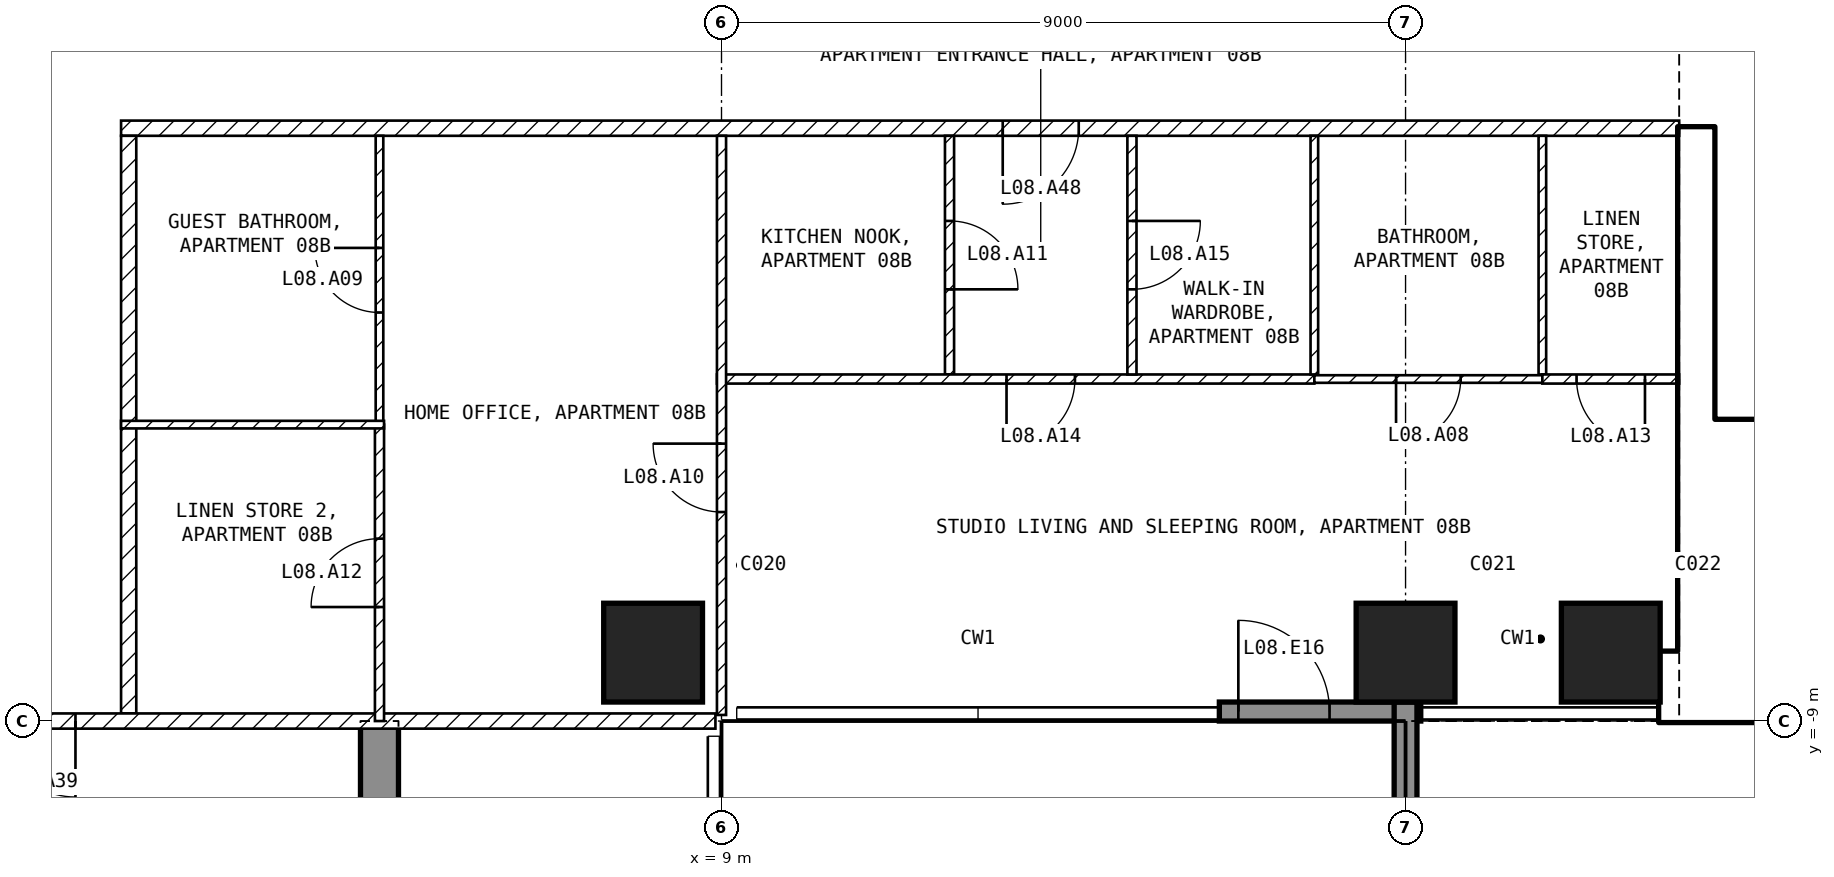
"""IFC4 building model, lengths in metres.
Left out: names, types, materials, properties, quantities, classifications, styles, units other than length and angle.
Written with IfcOpenShell. Run it as: python <this file> out.ifc"""

import sys

from ifc_helpers import new_model, si_unit, direction, frame, frame_2d, origin, origin_2d, place, context, subcontext, project, spatial, polyline, rectangle, outline, extrude, element, fill, save


model = new_model("IFC4")
c1 = context("Model", 3, precision=1e-05, world=origin(), true_north=direction((0.0, 1.0)))
c2 = subcontext(c1, "Body", "Model", "MODEL_VIEW")
j1 = project(units=[si_unit("LENGTHUNIT", "METRE"), si_unit("PLANEANGLEUNIT", "RADIAN")], contexts=[c1])
p1 = place(None, origin())
s1 = spatial("IfcSite", under=j1, at=p1, CompositionType="ELEMENT")
p2 = place(p1, origin())
s2 = spatial("IfcBuilding", under=s1, at=p2, CompositionType="ELEMENT")
p3 = place(p2, frame((0.0, 0.0, 47.0)))
s3 = spatial("IfcBuildingStorey", under=s2, at=p3, CompositionType="ELEMENT", Elevation=47.0)
for number, where, z_axis, x_axis in (
    (1, (8.1, -8.1, -0.25), (0.0, 0.0, 1.0), (1.0, 0.0, 0.0)),
    (2, (18.0, -8.1, -0.25), (0.0, 0.0, 1.0), (1.0, 0.0, 0.0)),
    (3, (20.7, -8.1, -0.25), (0.0, 0.0, 1.0), (1.0, 0.0, 0.0)),
):
    element("IfcColumn", number, at=place(p3, frame(where, z_axis=z_axis, x_axis=x_axis)), inside=s3, PredefinedType="COLUMN", context=c2, shape_type="SweptSolid", body=[
        extrude(rectangle(XDim=1.3, YDim=1.3, at=origin_2d()), origin(), (0.0, 0.0, 1.0), 3.5),
    ])
p4 = place(p3, frame((4.25, -25.45, -0.25), z_axis=(1.0, 0.0, 0.0), x_axis=(0.0, 1.0, 0.0)))
e4 = element("IfcWall", 4, at=p4, inside=s3, PredefinedType="SHEAR", context=c2, shape_type="SweptSolid", body=[
    extrude(outline(polyline([(0.0, 0.0), (4.15, 0.0), (4.15, 2.65), (6.55, 2.65), (6.55, 0.0), (11.95, 0.0), (11.95, 2.65), (14.35, 2.65), (14.35, 0.0), (16.45, 0.0), (16.45, 3.5), (0.0, 3.5), (0.0, 0.0)])), origin(), (0.0, 0.0, 1.0), 0.5),
])
p5 = place(p3, frame((15.55, -8.875, 0.0), z_axis=(0.0, 0.0, 1.0), x_axis=(1.0, 0.0, 0.0)))
e5 = element("IfcWall", 5, at=p5, inside=s3, PredefinedType="SOLIDWALL", context=c2, shape_type="SweptSolid", body=[
    extrude(rectangle(XDim=2.65, YDim=0.25, at=frame_2d((1.325, 0.0))), origin(), (0.0, 0.0, 1.0), 3.25),
])
p6 = place(p5, frame((0.25, 0.0, 0.0)))
e6 = element("IfcOpeningElement", 6, at=p6, cuts=e5, PredefinedType="OPENING", context=c2, shape_type="SweptSolid", body=[
    extrude(rectangle(XDim=1.2, YDim=2.4, at=frame_2d((0.6, 1.2))), frame((0.0, 0.135, 0.0), z_axis=(0.0, -1.0, 0.0), x_axis=(1.0, 0.0, 0.0)), (0.0, 0.0, 1.0), 0.27),
])
p7 = place(p3, frame((18.0, -8.75, 0.0), z_axis=(0.0, 0.0, 1.0), x_axis=(0.0, -1.0, 0.0)))
e7 = element("IfcWall", 7, at=p7, inside=s3, PredefinedType="SOLIDWALL", context=c2, shape_type="SweptSolid", body=[
    extrude(rectangle(XDim=2.95, YDim=0.3, at=frame_2d((1.475, 0.0))), origin(), (0.0, 0.0, 1.0), 3.25),
])
p8 = place(p3, frame((21.35, -8.55, 0.0), z_axis=(0.0, 0.0, 1.0), x_axis=(1.0, 0.0, 0.0)))
e8 = element("IfcWall", 8, at=p8, inside=s3, PredefinedType="SHEAR", context=c2, shape_type="SweptSolid", body=[
    extrude(rectangle(XDim=11.05, YDim=0.9, at=frame_2d((5.525, 0.0))), origin(), (0.0, 0.0, 1.0), 3.25),
])
p9 = place(p3, frame((21.825, -8.1, 0.0), z_axis=(0.0, 0.0, 1.0), x_axis=(0.0, 1.0, 0.0)))
e9 = element("IfcWall", 9, at=p9, inside=s3, PredefinedType="SHEAR", context=c2, shape_type="SweptSolid", body=[
    extrude(rectangle(XDim=6.9, YDim=0.45, at=frame_2d((3.45, 0.0))), origin(), (0.0, 0.0, 1.0), 3.25),
])
p10 = place(p3, frame((22.05, -5.15, 0.0), z_axis=(0.0, 0.0, 1.0), x_axis=(1.0, 0.0, 0.0)))
e10 = element("IfcWall", 10, at=p10, inside=s3, PredefinedType="SOLIDWALL", context=c2, shape_type="SweptSolid", body=[
    extrude(rectangle(XDim=6.3, YDim=0.2, at=frame_2d((3.15, 0.0))), origin(), (0.0, 0.0, 1.0), 3.25),
])
p11 = place(p10, frame((0.2, 0.0, 0.0)))
e11 = element("IfcOpeningElement", 11, at=p11, cuts=e10, PredefinedType="OPENING", context=c2, shape_type="SweptSolid", body=[
    extrude(rectangle(XDim=1.0, YDim=2.1, at=frame_2d((0.5, 1.05))), frame((0.0, 0.11, 0.0), z_axis=(0.0, -1.0, 0.0), x_axis=(1.0, 0.0, 0.0)), (0.0, 0.0, 1.0), 0.22),
])
p12 = place(p3, frame((21.6, -1.2, 0.0), z_axis=(0.0, 0.0, 1.0), x_axis=(-1.0, 0.0, 0.0)))
e12 = element("IfcWall", 12, at=p12, inside=s3, PredefinedType="PARTITIONING", context=c2, shape_type="SweptSolid", body=[
    extrude(rectangle(XDim=20.5, YDim=0.2, at=frame_2d((10.25, 0.0))), origin(), (0.0, 0.0, 1.0), 3.25),
])
p13 = place(p12, frame((7.9, 0.0, 0.0)))
e13 = element("IfcOpeningElement", 13, at=p13, cuts=e12, PredefinedType="OPENING", context=c2, shape_type="SweptSolid", body=[
    extrude(rectangle(XDim=1.0, YDim=2.1, at=frame_2d((0.5, 1.05))), frame((0.0, 0.11, 0.0), z_axis=(0.0, -1.0, 0.0), x_axis=(1.0, 0.0, 0.0)), (0.0, 0.0, 1.0), 0.22),
])
p14 = place(p3, frame((1.2, -1.3, 0.0), z_axis=(0.0, 0.0, 1.0), x_axis=(0.0, -1.0, 0.0)))
e14 = element("IfcWall", 14, at=p14, inside=s3, PredefinedType="PARTITIONING", context=c2, shape_type="SweptSolid", body=[
    extrude(rectangle(XDim=7.6, YDim=0.2, at=frame_2d((3.8, 0.0))), origin(), (0.0, 0.0, 1.0), 3.25),
])
p15 = place(p3, frame((8.92, -9.0, 0.0), z_axis=(0.0, 0.0, 1.0), x_axis=(-1.0, 0.0, 0.0)))
e15 = element("IfcWall", 15, at=p15, inside=s3, PredefinedType="PARTITIONING", context=c2, shape_type="SweptSolid", body=[
    extrude(rectangle(XDim=17.84, YDim=0.2, at=frame_2d((8.92, 0.0))), origin(), (0.0, 0.0, 1.0), 3.25),
])
p16 = place(p15, frame((8.42, 0.0, 0.0)))
e16 = element("IfcOpeningElement", 16, at=p16, cuts=e15, PredefinedType="OPENING", context=c2, shape_type="SweptSolid", body=[
    extrude(rectangle(XDim=1.0, YDim=2.1, at=frame_2d((0.5, 1.05))), frame((0.0, 0.11, 0.0), z_axis=(0.0, -1.0, 0.0), x_axis=(1.0, 0.0, 0.0)), (0.0, 0.0, 1.0), 0.22),
])
p17 = place(p3, frame((12.0, -1.3, 0.0), z_axis=(0.0, 0.0, 1.0), x_axis=(0.0, -1.0, 0.0)))
e17 = element("IfcWall", 17, at=p17, inside=s3, PredefinedType="PARTITIONING", context=c2, shape_type="SweptSolid", body=[
    extrude(rectangle(XDim=3.14, YDim=0.12, at=frame_2d((1.57, 0.0))), origin(), (0.0, 0.0, 1.0), 3.25),
])
p18 = place(p17, frame((1.12, 0.0, 0.0)))
e18 = element("IfcOpeningElement", 18, at=p18, cuts=e17, PredefinedType="OPENING", context=c2, shape_type="SweptSolid", body=[
    extrude(rectangle(XDim=0.9, YDim=2.1, at=frame_2d((0.45, 1.05))), frame((0.0, 0.07, 0.0), z_axis=(0.0, -1.0, 0.0), x_axis=(1.0, 0.0, 0.0)), (0.0, 0.0, 1.0), 0.14),
])
p19 = place(p3, frame((16.8, -4.5, 0.0), z_axis=(0.0, 0.0, 1.0), x_axis=(-1.0, 0.0, 0.0)))
e19 = element("IfcWall", 19, at=p19, inside=s3, PredefinedType="PARTITIONING", context=c2, shape_type="SweptSolid", body=[
    extrude(rectangle(XDim=7.86, YDim=0.12, at=frame_2d((3.93, 0.0))), origin(), (0.0, 0.0, 1.0), 3.25),
])
p20 = place(p19, frame((3.15, 0.0, 0.0)))
e20 = element("IfcOpeningElement", 20, at=p20, cuts=e19, PredefinedType="OPENING", context=c2, shape_type="SweptSolid", body=[
    extrude(rectangle(XDim=0.9, YDim=2.1, at=frame_2d((0.45, 1.05))), frame((0.0, 0.07, 0.0), z_axis=(0.0, -1.0, 0.0), x_axis=(1.0, 0.0, 0.0)), (0.0, 0.0, 1.0), 0.14),
])
p21 = place(p3, frame((9.0, -8.92, 0.0), z_axis=(0.0, 0.0, 1.0), x_axis=(0.0, 1.0, 0.0)))
e21 = element("IfcWall", 21, at=p21, inside=s3, PredefinedType="PARTITIONING", context=c2, shape_type="SweptSolid", body=[
    extrude(rectangle(XDim=7.62, YDim=0.12, at=frame_2d((3.81, 0.0))), origin(), (0.0, 0.0, 1.0), 3.25),
])
p22 = place(p21, frame((2.67, 0.0, 0.0)))
e22 = element("IfcOpeningElement", 22, at=p22, cuts=e21, PredefinedType="OPENING", context=c2, shape_type="SweptSolid", body=[
    extrude(rectangle(XDim=0.9, YDim=2.1, at=frame_2d((0.45, 1.05))), frame((0.0, 0.07, 0.0), z_axis=(0.0, -1.0, 0.0), x_axis=(1.0, 0.0, 0.0)), (0.0, 0.0, 1.0), 0.14),
])
p23 = place(p3, frame((14.4, -1.3, 0.0), z_axis=(0.0, 0.0, 1.0), x_axis=(0.0, -1.0, 0.0)))
e23 = element("IfcWall", 23, at=p23, inside=s3, PredefinedType="PARTITIONING", context=c2, shape_type="SweptSolid", body=[
    extrude(rectangle(XDim=3.14, YDim=0.12, at=frame_2d((1.57, 0.0))), origin(), (0.0, 0.0, 1.0), 3.25),
])
p24 = place(p23, frame((1.12, 0.0, 0.0)))
e24 = element("IfcOpeningElement", 24, at=p24, cuts=e23, PredefinedType="OPENING", context=c2, shape_type="SweptSolid", body=[
    extrude(rectangle(XDim=0.9, YDim=2.1, at=frame_2d((0.45, 1.05))), frame((0.0, 0.07, 0.0), z_axis=(0.0, -1.0, 0.0), x_axis=(1.0, 0.0, 0.0)), (0.0, 0.0, 1.0), 0.14),
])
for number, where, z_axis, x_axis in (
    (25, (16.8, -1.3, 0.0), (0.0, 0.0, 1.0), (0.0, -1.0, 0.0)),
    (26, (19.8, -1.3, 0.0), (0.0, 0.0, 1.0), (0.0, -1.0, 0.0)),
):
    element("IfcWall", number, at=place(p3, frame(where, z_axis=z_axis, x_axis=x_axis)), inside=s3, PredefinedType="PARTITIONING", context=c2, shape_type="SweptSolid", body=[
        extrude(rectangle(XDim=3.14, YDim=0.1, at=frame_2d((1.57, 0.0))), origin(), (0.0, 0.0, 1.0), 3.25),
    ])
p25 = place(p3, frame((19.8, -4.5, 0.0), z_axis=(0.0, 0.0, 1.0), x_axis=(-1.0, 0.0, 0.0)))
e27 = element("IfcWall", 27, at=p25, inside=s3, PredefinedType="PARTITIONING", context=c2, shape_type="SweptSolid", body=[
    extrude(rectangle(XDim=3.0, YDim=0.1, at=frame_2d((1.5, 0.0))), origin(), (0.0, 0.0, 1.0), 3.25),
])
p26 = place(p25, frame((1.075, 0.0, 0.0)))
e28 = element("IfcOpeningElement", 28, at=p26, cuts=e27, PredefinedType="OPENING", context=c2, shape_type="SweptSolid", body=[
    extrude(rectangle(XDim=0.85, YDim=2.1, at=frame_2d((0.425, 1.05))), frame((0.0, 0.06, 0.0), z_axis=(0.0, -1.0, 0.0), x_axis=(1.0, 0.0, 0.0)), (0.0, 0.0, 1.0), 0.12),
])
p27 = place(p3, frame((21.6, -4.5, 0.0), z_axis=(0.0, 0.0, 1.0), x_axis=(-1.0, 0.0, 0.0)))
e29 = element("IfcWall", 29, at=p27, inside=s3, PredefinedType="PARTITIONING", context=c2, shape_type="SweptSolid", body=[
    extrude(rectangle(XDim=1.8, YDim=0.12, at=frame_2d((0.9, 0.0))), origin(), (0.0, 0.0, 1.0), 3.25),
])
p28 = place(p27, frame((0.45, 0.0, 0.0)))
e30 = element("IfcOpeningElement", 30, at=p28, cuts=e29, PredefinedType="OPENING", context=c2, shape_type="SweptSolid", body=[
    extrude(rectangle(XDim=0.9, YDim=2.1, at=frame_2d((0.45, 1.05))), frame((0.0, 0.07, 0.0), z_axis=(0.0, -1.0, 0.0), x_axis=(1.0, 0.0, 0.0)), (0.0, 0.0, 1.0), 0.14),
])
p29 = place(p3, frame((4.5, -5.1, 0.0), z_axis=(0.0, 0.0, 1.0), x_axis=(0.0, 1.0, 0.0)))
e31 = element("IfcWall", 31, at=p29, inside=s3, PredefinedType="PARTITIONING", context=c2, shape_type="SweptSolid", body=[
    extrude(rectangle(XDim=3.8, YDim=0.1, at=frame_2d((1.9, 0.0))), origin(), (0.0, 0.0, 1.0), 3.25),
])
p30 = place(p29, frame((1.475, 0.0, 0.0)))
e32 = element("IfcOpeningElement", 32, at=p30, cuts=e31, PredefinedType="OPENING", context=c2, shape_type="SweptSolid", body=[
    extrude(rectangle(XDim=0.85, YDim=2.1, at=frame_2d((0.425, 1.05))), frame((0.0, 0.06, 0.0), z_axis=(0.0, -1.0, 0.0), x_axis=(1.0, 0.0, 0.0)), (0.0, 0.0, 1.0), 0.12),
])
p31 = place(p3, frame((4.5, -9.0, 0.0), z_axis=(0.0, 0.0, 1.0), x_axis=(0.0, 1.0, 0.0)))
e33 = element("IfcWall", 33, at=p31, inside=s3, PredefinedType="PARTITIONING", context=c2, shape_type="SweptSolid", body=[
    extrude(rectangle(XDim=3.9, YDim=0.12, at=frame_2d((1.95, 0.0))), origin(), (0.0, 0.0, 1.0), 3.25),
])
p32 = place(p31, frame((1.5, 0.0, 0.0)))
e34 = element("IfcOpeningElement", 34, at=p32, cuts=e33, PredefinedType="OPENING", context=c2, shape_type="SweptSolid", body=[
    extrude(rectangle(XDim=0.9, YDim=2.1, at=frame_2d((0.45, 1.05))), frame((0.0, 0.07, 0.0), z_axis=(0.0, -1.0, 0.0), x_axis=(1.0, 0.0, 0.0)), (0.0, 0.0, 1.0), 0.14),
])
p33 = place(p3, frame((4.56, -5.1, 0.0), z_axis=(0.0, 0.0, 1.0), x_axis=(-1.0, 0.0, 0.0)))
e35 = element("IfcWall", 35, at=p33, inside=s3, PredefinedType="PARTITIONING", context=c2, shape_type="SweptSolid", body=[
    extrude(rectangle(XDim=3.46, YDim=0.1, at=frame_2d((1.73, 0.0))), origin(), (0.0, 0.0, 1.0), 3.25),
])
p34 = place(p6, origin())
e36 = element("IfcDoor", 36, at=p34, inside=s3, OperationType="SINGLE_SWING_LEFT", PredefinedType="DOOR", context=c2, shape_type="SweptSolid", body=[
    extrude(rectangle(XDim=1.2, YDim=2.4, at=frame_2d((0.6, 1.2))), frame((0.0, 0.025, 0.0), z_axis=(0.0, -1.0, 0.0), x_axis=(1.0, 0.0, 0.0)), (0.0, 0.0, 1.0), 0.05),
])
fill(e6, e36)
p35 = place(p11, origin())
e37 = element("IfcDoor", 37, at=p35, inside=s3, OperationType="SINGLE_SWING_LEFT", PredefinedType="DOOR", context=c2, shape_type="SweptSolid", body=[
    extrude(rectangle(XDim=1.0, YDim=2.1, at=frame_2d((0.5, 1.05))), frame((0.0, 0.025, 0.0), z_axis=(0.0, -1.0, 0.0), x_axis=(1.0, 0.0, 0.0)), (0.0, 0.0, 1.0), 0.05),
])
fill(e11, e37)
p36 = place(p26, origin())
e38 = element("IfcDoor", 38, at=p36, inside=s3, OperationType="SINGLE_SWING_RIGHT", PredefinedType="DOOR", context=c2, shape_type="SweptSolid", body=[
    extrude(rectangle(XDim=0.85, YDim=2.1, at=frame_2d((0.425, 1.05))), frame((0.0, 0.025, 0.0), z_axis=(0.0, -1.0, 0.0), x_axis=(1.0, 0.0, 0.0)), (0.0, 0.0, 1.0), 0.05),
])
fill(e28, e38)
p37 = place(p30, origin())
e39 = element("IfcDoor", 39, at=p37, inside=s3, OperationType="SINGLE_SWING_RIGHT", PredefinedType="DOOR", context=c2, shape_type="SweptSolid", body=[
    extrude(rectangle(XDim=0.85, YDim=2.1, at=frame_2d((0.425, 1.05))), frame((0.0, 0.025, 0.0), z_axis=(0.0, -1.0, 0.0), x_axis=(1.0, 0.0, 0.0)), (0.0, 0.0, 1.0), 0.05),
])
fill(e32, e39)
p38 = place(p22, origin())
e40 = element("IfcDoor", 40, at=p38, inside=s3, OperationType="SINGLE_SWING_RIGHT", PredefinedType="DOOR", context=c2, shape_type="SweptSolid", body=[
    extrude(rectangle(XDim=0.9, YDim=2.1, at=frame_2d((0.45, 1.05))), frame((0.0, 0.025, 0.0), z_axis=(0.0, -1.0, 0.0), x_axis=(1.0, 0.0, 0.0)), (0.0, 0.0, 1.0), 0.05),
])
fill(e22, e40)
p39 = place(p18, origin())
e41 = element("IfcDoor", 41, at=p39, inside=s3, OperationType="SINGLE_SWING_RIGHT", PredefinedType="DOOR", context=c2, shape_type="SweptSolid", body=[
    extrude(rectangle(XDim=0.9, YDim=2.1, at=frame_2d((0.45, 1.05))), frame((0.0, 0.025, 0.0), z_axis=(0.0, -1.0, 0.0), x_axis=(1.0, 0.0, 0.0)), (0.0, 0.0, 1.0), 0.05),
])
fill(e18, e41)
p40 = place(p32, origin())
e42 = element("IfcDoor", 42, at=p40, inside=s3, OperationType="SINGLE_SWING_LEFT", PredefinedType="DOOR", context=c2, shape_type="SweptSolid", body=[
    extrude(rectangle(XDim=0.9, YDim=2.1, at=frame_2d((0.45, 1.05))), frame((0.0, 0.025, 0.0), z_axis=(0.0, -1.0, 0.0), x_axis=(1.0, 0.0, 0.0)), (0.0, 0.0, 1.0), 0.05),
])
fill(e34, e42)
p41 = place(p28, origin())
e43 = element("IfcDoor", 43, at=p41, inside=s3, OperationType="SINGLE_SWING_LEFT", PredefinedType="DOOR", context=c2, shape_type="SweptSolid", body=[
    extrude(rectangle(XDim=0.9, YDim=2.1, at=frame_2d((0.45, 1.05))), frame((0.0, 0.025, 0.0), z_axis=(0.0, -1.0, 0.0), x_axis=(1.0, 0.0, 0.0)), (0.0, 0.0, 1.0), 0.05),
])
fill(e30, e43)
p42 = place(p20, origin())
e44 = element("IfcDoor", 44, at=p42, inside=s3, OperationType="SINGLE_SWING_RIGHT", PredefinedType="DOOR", context=c2, shape_type="SweptSolid", body=[
    extrude(rectangle(XDim=0.9, YDim=2.1, at=frame_2d((0.45, 1.05))), frame((0.0, 0.025, 0.0), z_axis=(0.0, -1.0, 0.0), x_axis=(1.0, 0.0, 0.0)), (0.0, 0.0, 1.0), 0.05),
])
fill(e20, e44)
p43 = place(p24, origin())
e45 = element("IfcDoor", 45, at=p43, inside=s3, OperationType="SINGLE_SWING_LEFT", PredefinedType="DOOR", context=c2, shape_type="SweptSolid", body=[
    extrude(rectangle(XDim=0.9, YDim=2.1, at=frame_2d((0.45, 1.05))), frame((0.0, 0.025, 0.0), z_axis=(0.0, -1.0, 0.0), x_axis=(1.0, 0.0, 0.0)), (0.0, 0.0, 1.0), 0.05),
])
fill(e24, e45)
p44 = place(p16, origin())
e46 = element("IfcDoor", 46, at=p44, inside=s3, OperationType="SINGLE_SWING_LEFT", PredefinedType="DOOR", context=c2, shape_type="SweptSolid", body=[
    extrude(rectangle(XDim=1.0, YDim=2.1, at=frame_2d((0.5, 1.05))), frame((0.0, 0.025, 0.0), z_axis=(0.0, -1.0, 0.0), x_axis=(1.0, 0.0, 0.0)), (0.0, 0.0, 1.0), 0.05),
])
fill(e16, e46)
p45 = place(p13, origin())
e47 = element("IfcDoor", 47, at=p45, inside=s3, OperationType="SINGLE_SWING_RIGHT", PredefinedType="DOOR", context=c2, shape_type="SweptSolid", body=[
    extrude(rectangle(XDim=1.0, YDim=2.1, at=frame_2d((0.5, 1.05))), frame((0.0, 0.025, 0.0), z_axis=(0.0, -1.0, 0.0), x_axis=(1.0, 0.0, 0.0)), (0.0, 0.0, 1.0), 0.05),
])
fill(e13, e47)
save(model, sys.argv[1])
